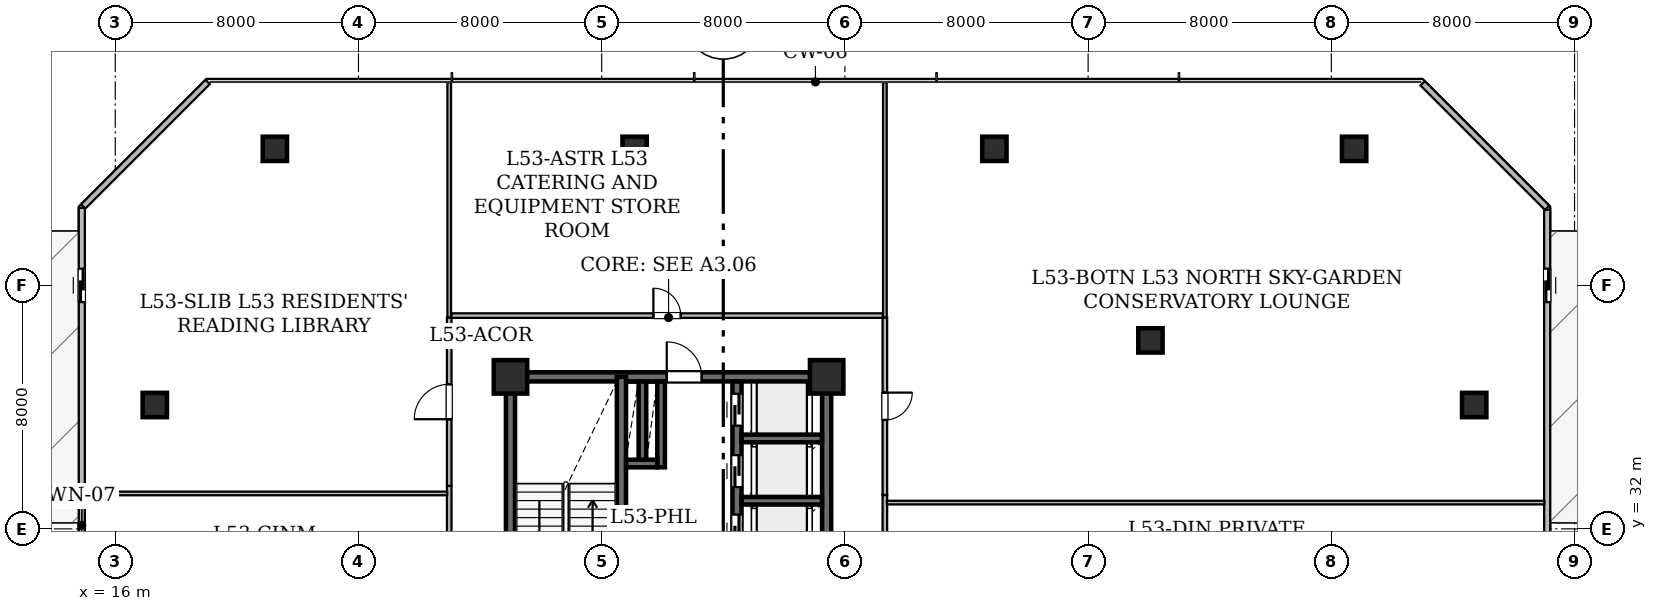
"""IFC4 building model, lengths in metres.
Left out: names, types, materials, properties, quantities, classifications, styles, units other than length and angle.
Written with IfcOpenShell. Run it as: python <this file> out.ifc"""

import sys

from ifc_helpers import new_model, si_unit, direction, frame, frame_2d, origin, origin_2d, place, context, subcontext, project, spatial, rectangle, hollow_rectangle, extrude, element, fill, save


model = new_model("IFC4")
c1 = context("Model", 3, precision=1e-05, world=origin(), true_north=direction((0.0, 1.0)))
c2 = subcontext(c1, "Body", "Model", "MODEL_VIEW")
j1 = project(units=[si_unit("LENGTHUNIT", "METRE"), si_unit("PLANEANGLEUNIT", "RADIAN")], contexts=[c1])
p1 = place(None, origin())
s1 = spatial("IfcSite", under=j1, at=p1, CompositionType="ELEMENT")
p2 = place(p1, origin())
s2 = spatial("IfcBuilding", under=s1, at=p2, CompositionType="ELEMENT")
p3 = place(p2, frame((0.0, 0.0, 207.0)))
s3 = spatial("IfcBuildingStorey", under=s2, at=p3, CompositionType="ELEMENT", Elevation=207.0)
for number, where, z_axis, x_axis in (
    (1, (29.0, 37.0, 0.0), (0.0, 0.0, 1.0), (1.0, 0.0, 0.0)),
    (2, (39.4, 37.0, 0.0), (0.0, 0.0, 1.0), (1.0, 0.0, 0.0)),
):
    element("IfcColumn", number, at=place(p3, frame(where, z_axis=z_axis, x_axis=x_axis)), inside=s3, PredefinedType="COLUMN", context=c2, shape_type="SweptSolid", body=[
        extrude(hollow_rectangle(XDim=1.1, YDim=1.1, WallThickness=0.055, at=origin_2d()), origin(), (0.0, 0.0, 1.0), 4.8),
    ])
for number, where, z_axis, x_axis in (
    (3, (21.25, 44.5, 0.0), (0.0, 0.0, 1.0), (1.0, 0.0, 0.0)),
    (4, (33.083, 44.5, 0.0), (0.0, 0.0, 1.0), (1.0, 0.0, 0.0)),
    (5, (44.917, 44.5, 0.0), (0.0, 0.0, 1.0), (1.0, 0.0, 0.0)),
    (6, (56.75, 44.5, 0.0), (0.0, 0.0, 1.0), (1.0, 0.0, 0.0)),
    (7, (17.3, 36.075, 0.0), (0.0, 0.0, 1.0), (1.0, 0.0, 0.0)),
    (8, (60.7, 36.075, 0.0), (0.0, 0.0, 1.0), (1.0, 0.0, 0.0)),
    (9, (50.05, 38.2, 0.0), (0.0, 0.0, 1.0), (1.0, 0.0, 0.0)),
):
    element("IfcColumn", number, at=place(p3, frame(where, z_axis=z_axis, x_axis=x_axis)), inside=s3, PredefinedType="COLUMN", context=c2, shape_type="SweptSolid", body=[
        extrude(hollow_rectangle(XDim=0.8, YDim=0.8, WallThickness=0.04, at=origin_2d()), origin(), (0.0, 0.0, 1.0), 4.8),
    ])
p4 = place(p3, frame((14.9, 31.284, 0.0), z_axis=(0.0, 0.0, 1.0), x_axis=(0.0, 1.0, 0.0)))
e10 = element("IfcWall", 10, at=p4, inside=s3, PredefinedType="STANDARD", context=c2, shape_type="SweptSolid", body=[
    extrude(rectangle(XDim=11.275, YDim=0.2, at=frame_2d((5.638, 0.0))), origin(), (0.0, 0.0, 1.0), 4.48),
])
p5 = place(p4, frame((8.175, 0.0, 0.0)))
e11 = element("IfcOpeningElement", 11, at=p5, cuts=e10, PredefinedType="OPENING", context=c2, shape_type="SweptSolid", body=[
    extrude(rectangle(XDim=1.1, YDim=2.2, at=frame_2d((0.55, 1.1))), frame((0.0, 0.11, 0.0), z_axis=(0.0, -1.0, 0.0), x_axis=(1.0, 0.0, 0.0)), (0.0, 0.0, 1.0), 0.22),
])
p6 = place(p4, frame((0.158, 0.0, 0.85)))
e12 = element("IfcOpeningElement", 12, at=p6, cuts=e10, PredefinedType="OPENING", context=c2, shape_type="SweptSolid", body=[
    extrude(rectangle(XDim=1.35, YDim=1.5, at=frame_2d((0.675, 0.75))), frame((0.0, 0.11, 0.0), z_axis=(0.0, -1.0, 0.0), x_axis=(1.0, 0.0, 0.0)), (0.0, 0.0, 1.0), 0.22),
])
p7 = place(p3, frame((14.945, 42.604, 0.0), z_axis=(0.0, 0.0, 1.0), x_axis=(0.707106781187, 0.707106781187, 0.0)))
e13 = element("IfcWall", 13, at=p7, inside=s3, PredefinedType="STANDARD", context=c2, shape_type="SweptSolid", body=[
    extrude(rectangle(XDim=5.792, YDim=0.2, at=frame_2d((2.896, 0.0))), origin(), (0.0, 0.0, 1.0), 4.48),
])
p8 = place(p3, frame((59.003, 46.656, 0.0), z_axis=(0.0, 0.0, 1.0), x_axis=(0.707127848917, -0.707085712828, 0.0)))
e14 = element("IfcWall", 14, at=p8, inside=s3, PredefinedType="STANDARD", context=c2, shape_type="SweptSolid", body=[
    extrude(rectangle(XDim=5.794, YDim=0.2, at=frame_2d((2.897, 0.0))), origin(), (0.0, 0.0, 1.0), 4.48),
])
p9 = place(p3, frame((63.1, 42.496, 0.0), z_axis=(0.0, 0.0, 1.0), x_axis=(0.0, -1.0, 0.0)))
e15 = element("IfcWall", 15, at=p9, inside=s3, PredefinedType="STANDARD", context=c2, shape_type="SweptSolid", body=[
    extrude(rectangle(XDim=11.263, YDim=0.2, at=frame_2d((5.632, 0.0))), origin(), (0.0, 0.0, 1.0), 4.48),
])
p10 = place(p9, frame((1.937, 0.0, 0.0)))
e16 = element("IfcOpeningElement", 16, at=p10, cuts=e15, PredefinedType="OPENING", context=c2, shape_type="SweptSolid", body=[
    extrude(rectangle(XDim=1.1, YDim=2.2, at=frame_2d((0.55, 1.1))), frame((0.0, 0.11, 0.0), z_axis=(0.0, -1.0, 0.0), x_axis=(1.0, 0.0, 0.0)), (0.0, 0.0, 1.0), 0.22),
])
p11 = place(p3, frame((29.0, 28.0, 0.0), z_axis=(0.0, 0.0, 1.0), x_axis=(0.0, 1.0, 0.0)))
e17 = element("IfcWall", 17, at=p11, inside=s3, PredefinedType="SHEAR", context=c2, shape_type="SweptSolid", body=[
    extrude(rectangle(XDim=9.0, YDim=0.3, at=frame_2d((4.5, 0.0))), origin(), (0.0, 0.0, 1.0), 4.48),
])
p12 = place(p3, frame((29.0, 37.0, 0.0), z_axis=(0.0, 0.0, 1.0), x_axis=(1.0, 0.0, 0.0)))
e18 = element("IfcWall", 18, at=p12, inside=s3, PredefinedType="SHEAR", context=c2, shape_type="SweptSolid", body=[
    extrude(rectangle(XDim=10.4, YDim=0.3, at=frame_2d((5.2, 0.0))), origin(), (0.0, 0.0, 1.0), 4.48),
])
p13 = place(p12, frame((5.14, 0.0, 0.0)))
e19 = element("IfcOpeningElement", 19, at=p13, cuts=e18, PredefinedType="OPENING", context=c2, shape_type="SweptSolid", body=[
    extrude(rectangle(XDim=1.15, YDim=2.2, at=frame_2d((0.575, 1.1))), frame((0.0, 0.16, 0.0), z_axis=(0.0, -1.0, 0.0), x_axis=(1.0, 0.0, 0.0)), (0.0, 0.0, 1.0), 0.32),
])
p14 = place(p3, frame((39.4, 24.4, 0.0), z_axis=(0.0, 0.0, 1.0), x_axis=(0.0, 1.0, 0.0)))
e20 = element("IfcWall", 20, at=p14, inside=s3, PredefinedType="SHEAR", context=c2, shape_type="SweptSolid", body=[
    extrude(rectangle(XDim=12.6, YDim=0.3, at=frame_2d((6.3, 0.0))), origin(), (0.0, 0.0, 1.0), 4.48),
])
p15 = place(p3, frame((32.65, 28.0, 0.0), z_axis=(0.0, 0.0, 1.0), x_axis=(0.0, 1.0, 0.0)))
e21 = element("IfcWall", 21, at=p15, inside=s3, PredefinedType="SHEAR", context=c2, shape_type="SweptSolid", body=[
    extrude(rectangle(XDim=9.0, YDim=0.3, at=frame_2d((4.5, 0.0))), origin(), (0.0, 0.0, 1.0), 4.48),
])
p16 = place(p15, frame((0.72, 0.0, 0.0)))
e22 = element("IfcOpeningElement", 22, at=p16, cuts=e21, PredefinedType="OPENING", context=c2, shape_type="SweptSolid", body=[
    extrude(rectangle(XDim=1.0, YDim=2.15, at=frame_2d((0.5, 1.075))), frame((0.0, 0.16, 0.0), z_axis=(0.0, -1.0, 0.0), x_axis=(1.0, 0.0, 0.0)), (0.0, 0.0, 1.0), 0.32),
])
p17 = place(p3, frame((36.45, 31.3, 0.0), z_axis=(0.0, 0.0, 1.0), x_axis=(0.0, 1.0, 0.0)))
e23 = element("IfcWall", 23, at=p17, inside=s3, PredefinedType="SHEAR", context=c2, shape_type="SweptSolid", body=[
    extrude(rectangle(XDim=5.546, YDim=0.3, at=frame_2d((2.773, 0.0))), origin(), (0.0, 0.0, 1.0), 4.48),
])
p18 = place(p17, frame((0.12, 0.0, 0.0)))
e24 = element("IfcOpeningElement", 24, at=p18, cuts=e23, PredefinedType="OPENING", context=c2, shape_type="SweptSolid", body=[
    extrude(rectangle(XDim=1.05, YDim=2.15, at=frame_2d((0.525, 1.075))), frame((0.0, 0.16, 0.0), z_axis=(0.0, -1.0, 0.0), x_axis=(1.0, 0.0, 0.0)), (0.0, 0.0, 1.0), 0.32),
])
p19 = place(p17, frame((2.075, 0.0, 0.0)))
e25 = element("IfcOpeningElement", 25, at=p19, cuts=e23, PredefinedType="OPENING", context=c2, shape_type="SweptSolid", body=[
    extrude(rectangle(XDim=1.05, YDim=2.15, at=frame_2d((0.525, 1.075))), frame((0.0, 0.16, 0.0), z_axis=(0.0, -1.0, 0.0), x_axis=(1.0, 0.0, 0.0)), (0.0, 0.0, 1.0), 0.32),
])
p20 = place(p17, frame((4.095, 0.0, 0.0)))
e26 = element("IfcOpeningElement", 26, at=p20, cuts=e23, PredefinedType="OPENING", context=c2, shape_type="SweptSolid", body=[
    extrude(rectangle(XDim=1.05, YDim=2.15, at=frame_2d((0.525, 1.075))), frame((0.0, 0.16, 0.0), z_axis=(0.0, -1.0, 0.0), x_axis=(1.0, 0.0, 0.0)), (0.0, 0.0, 1.0), 0.32),
])
for number, where, z_axis, x_axis in (
    (27, (36.604, 32.925, 0.0), (0.0, 0.0, 1.0), (1.0, 0.0, 0.0)),
    (28, (36.604, 34.975, 0.0), (0.0, 0.0, 1.0), (1.0, 0.0, 0.0)),
):
    element("IfcWall", number, at=place(p3, frame(where, z_axis=z_axis, x_axis=x_axis)), inside=s3, PredefinedType="SHEAR", context=c2, shape_type="SweptSolid", body=[
        extrude(rectangle(XDim=2.642, YDim=0.25, at=frame_2d((1.321, 0.0))), origin(), (0.0, 0.0, 1.0), 4.48),
    ])
p21 = place(p3, frame((33.955, 34.025, 0.0), z_axis=(0.0, 0.0, 1.0), x_axis=(0.0, 1.0, 0.0)))
e29 = element("IfcWall", 29, at=p21, inside=s3, PredefinedType="SHEAR", context=c2, shape_type="SweptSolid", body=[
    extrude(rectangle(XDim=2.821, YDim=0.25, at=frame_2d((1.411, 0.0))), origin(), (0.0, 0.0, 1.0), 4.48),
])
p22 = place(p3, frame((32.804, 34.15, 0.0), z_axis=(0.0, 0.0, 1.0), x_axis=(1.0, 0.0, 0.0)))
e30 = element("IfcWall", 30, at=p22, inside=s3, PredefinedType="SHEAR", context=c2, shape_type="SweptSolid", body=[
    extrude(rectangle(XDim=1.022, YDim=0.25, at=frame_2d((0.511, 0.0))), origin(), (0.0, 0.0, 1.0), 4.48),
])
p23 = place(p3, frame((33.34, 34.279, 0.0), z_axis=(0.0, 0.0, 1.0), x_axis=(0.0, 1.0, 0.0)))
e31 = element("IfcWall", 31, at=p23, inside=s3, PredefinedType="SHEAR", context=c2, shape_type="SweptSolid", body=[
    extrude(rectangle(XDim=2.567, YDim=0.25, at=frame_2d((1.283, 0.0))), origin(), (0.0, 0.0, 1.0), 4.48),
])
p24 = place(p3, frame((26.985, 28.314, 0.0), z_axis=(0.0, 0.0, 1.0), x_axis=(0.0, 1.0, 0.0)))
e32 = element("IfcWall", 32, at=p24, inside=s3, PredefinedType="STANDARD", context=c2, shape_type="SweptSolid", body=[
    extrude(rectangle(XDim=5.1, YDim=0.15, at=frame_2d((2.55, 0.0))), origin(), (0.0, 0.0, 1.0), 4.007),
])
p25 = place(p24, frame((2.079, 0.0, 0.0)))
e33 = element("IfcOpeningElement", 33, at=p25, cuts=e32, PredefinedType="OPENING", context=c2, shape_type="SweptSolid", body=[
    extrude(rectangle(XDim=0.9, YDim=2.1, at=frame_2d((0.45, 1.05))), frame((0.0, 0.085, 0.0), z_axis=(0.0, -1.0, 0.0), x_axis=(1.0, 0.0, 0.0)), (0.0, 0.0, 1.0), 0.17),
])
p26 = place(p3, frame((26.985, 33.414, 0.0), z_axis=(0.0, 0.0, 1.0), x_axis=(0.0, 1.0, 0.0)))
e34 = element("IfcWall", 34, at=p26, inside=s3, PredefinedType="STANDARD", context=c2, shape_type="SweptSolid", body=[
    extrude(rectangle(XDim=5.536, YDim=0.15, at=frame_2d((2.768, 0.0))), origin(), (0.0, 0.0, 1.0), 3.775),
])
p27 = place(p26, frame((2.193, 0.0, 0.0)))
e35 = element("IfcOpeningElement", 35, at=p27, cuts=e34, PredefinedType="OPENING", context=c2, shape_type="SweptSolid", body=[
    extrude(rectangle(XDim=1.15, YDim=2.2, at=frame_2d((0.575, 1.1))), frame((0.0, 0.085, 0.0), z_axis=(0.0, -1.0, 0.0), x_axis=(1.0, 0.0, 0.0)), (0.0, 0.0, 1.0), 0.17),
])
p28 = place(p3, frame((41.315, 33.114, 0.0), z_axis=(0.0, 0.0, 1.0), x_axis=(0.0, -1.0, 0.0)))
e36 = element("IfcWall", 36, at=p28, inside=s3, PredefinedType="STANDARD", context=c2, shape_type="SweptSolid", body=[
    extrude(rectangle(XDim=4.8, YDim=0.15, at=frame_2d((2.4, 0.0))), origin(), (0.0, 0.0, 1.0), 4.007),
])
p29 = place(p28, frame((1.846, 0.0, 0.0)))
e37 = element("IfcOpeningElement", 37, at=p29, cuts=e36, PredefinedType="OPENING", context=c2, shape_type="SweptSolid", body=[
    extrude(rectangle(XDim=1.15, YDim=2.2, at=frame_2d((0.575, 1.1))), frame((0.0, 0.085, 0.0), z_axis=(0.0, -1.0, 0.0), x_axis=(1.0, 0.0, 0.0)), (0.0, 0.0, 1.0), 0.17),
])
p30 = place(p3, frame((41.315, 38.95, 0.0), z_axis=(0.0, 0.0, 1.0), x_axis=(0.0, -1.0, 0.0)))
e38 = element("IfcWall", 38, at=p30, inside=s3, PredefinedType="STANDARD", context=c2, shape_type="SweptSolid", body=[
    extrude(rectangle(XDim=5.836, YDim=0.15, at=frame_2d((2.918, 0.0))), origin(), (0.0, 0.0, 1.0), 3.775),
])
p31 = place(p30, frame((2.468, 0.0, 0.0)))
e39 = element("IfcOpeningElement", 39, at=p31, cuts=e38, PredefinedType="OPENING", context=c2, shape_type="SweptSolid", body=[
    extrude(rectangle(XDim=0.9, YDim=2.1, at=frame_2d((0.45, 1.05))), frame((0.0, 0.085, 0.0), z_axis=(0.0, -1.0, 0.0), x_axis=(1.0, 0.0, 0.0)), (0.0, 0.0, 1.0), 0.17),
])
p32 = place(p3, frame((27.05, 39.015, 0.0), z_axis=(0.0, 0.0, 1.0), x_axis=(1.0, 0.0, 0.0)))
e40 = element("IfcWall", 40, at=p32, inside=s3, PredefinedType="STANDARD", context=c2, shape_type="SweptSolid", body=[
    extrude(rectangle(XDim=14.2, YDim=0.15, at=frame_2d((7.1, 0.0))), origin(), (0.0, 0.0, 1.0), 3.775),
])
p33 = place(p32, frame((6.65, 0.0, 0.0)))
e41 = element("IfcOpeningElement", 41, at=p33, cuts=e40, PredefinedType="OPENING", context=c2, shape_type="SweptSolid", body=[
    extrude(rectangle(XDim=0.9, YDim=2.1, at=frame_2d((0.45, 1.05))), frame((0.0, 0.085, 0.0), z_axis=(0.0, -1.0, 0.0), x_axis=(1.0, 0.0, 0.0)), (0.0, 0.0, 1.0), 0.17),
])
p34 = place(p3, frame((14.992, 33.165, 0.0), z_axis=(0.0, 0.0, 1.0), x_axis=(1.0, 0.0, 0.0)))
e42 = element("IfcWall", 42, at=p34, inside=s3, PredefinedType="PARTITIONING", context=c2, shape_type="SweptSolid", body=[
    extrude(rectangle(XDim=11.926, YDim=0.12, at=frame_2d((5.963, 0.0))), origin(), (0.0, 0.0, 1.0), 3.937),
])
p35 = place(p3, frame((26.985, 46.69, 0.0), z_axis=(0.0, 0.0, 1.0), x_axis=(0.0, -1.0, 0.0)))
e43 = element("IfcWall", 43, at=p35, inside=s3, PredefinedType="PARTITIONING", context=c2, shape_type="SweptSolid", body=[
    extrude(rectangle(XDim=7.74, YDim=0.12, at=frame_2d((3.87, 0.0))), origin(), (0.0, 0.0, 1.0), 3.775),
])
p36 = place(p3, frame((41.38, 32.865, 0.0), z_axis=(0.0, 0.0, 1.0), x_axis=(1.0, 0.0, 0.0)))
e44 = element("IfcWall", 44, at=p36, inside=s3, PredefinedType="PARTITIONING", context=c2, shape_type="SweptSolid", body=[
    extrude(rectangle(XDim=21.628, YDim=0.12, at=frame_2d((10.814, 0.0))), origin(), (0.0, 0.0, 1.0), 3.775),
])
p37 = place(p3, frame((41.315, 38.95, 0.0), z_axis=(0.0, 0.0, 1.0), x_axis=(0.0, 1.0, 0.0)))
e45 = element("IfcWall", 45, at=p37, inside=s3, PredefinedType="PARTITIONING", context=c2, shape_type="SweptSolid", body=[
    extrude(rectangle(XDim=7.74, YDim=0.12, at=frame_2d((3.87, 0.0))), origin(), (0.0, 0.0, 1.0), 3.775),
])
p38 = place(p5, origin())
e46 = element("IfcDoor", 46, at=p38, inside=s3, OperationType="SLIDING_TO_LEFT", PredefinedType="DOOR", context=c2, shape_type="SweptSolid", body=[
    extrude(rectangle(XDim=1.1, YDim=2.2, at=frame_2d((0.55, 1.1))), frame((0.0, 0.025, 0.0), z_axis=(0.0, -1.0, 0.0), x_axis=(1.0, 0.0, 0.0)), (0.0, 0.0, 1.0), 0.05),
])
fill(e11, e46)
p39 = place(p10, origin())
e47 = element("IfcDoor", 47, at=p39, inside=s3, OperationType="SLIDING_TO_LEFT", PredefinedType="DOOR", context=c2, shape_type="SweptSolid", body=[
    extrude(rectangle(XDim=1.1, YDim=2.2, at=frame_2d((0.55, 1.1))), frame((0.0, 0.025, 0.0), z_axis=(0.0, -1.0, 0.0), x_axis=(1.0, 0.0, 0.0)), (0.0, 0.0, 1.0), 0.05),
])
fill(e16, e47)
p40 = place(p6, origin())
e48 = element("IfcWindow", 48, at=p40, inside=s3, PartitioningType="SINGLE_PANEL", PredefinedType="WINDOW", context=c2, shape_type="SweptSolid", body=[
    extrude(rectangle(XDim=1.35, YDim=1.5, at=frame_2d((0.675, 0.75))), frame((0.0, 0.03, 0.0), z_axis=(0.0, -1.0, 0.0), x_axis=(1.0, 0.0, 0.0)), (0.0, 0.0, 1.0), 0.06),
])
fill(e12, e48)
p41 = place(p13, origin())
e49 = element("IfcDoor", 49, at=p41, inside=s3, OperationType="SINGLE_SWING_LEFT", PredefinedType="DOOR", context=c2, shape_type="SweptSolid", body=[
    extrude(rectangle(XDim=1.15, YDim=2.2, at=frame_2d((0.575, 1.1))), frame((0.0, 0.025, 0.0), z_axis=(0.0, -1.0, 0.0), x_axis=(1.0, 0.0, 0.0)), (0.0, 0.0, 1.0), 0.05),
])
fill(e19, e49)
p42 = place(p18, origin())
e50 = element("IfcDoor", 50, at=p42, inside=s3, OperationType="SLIDING_TO_LEFT", PredefinedType="DOOR", context=c2, shape_type="SweptSolid", body=[
    extrude(rectangle(XDim=1.05, YDim=2.15, at=frame_2d((0.525, 1.075))), frame((0.0, 0.025, 0.0), z_axis=(0.0, -1.0, 0.0), x_axis=(1.0, 0.0, 0.0)), (0.0, 0.0, 1.0), 0.05),
])
fill(e24, e50)
p43 = place(p19, origin())
e51 = element("IfcDoor", 51, at=p43, inside=s3, OperationType="SLIDING_TO_LEFT", PredefinedType="DOOR", context=c2, shape_type="SweptSolid", body=[
    extrude(rectangle(XDim=1.05, YDim=2.15, at=frame_2d((0.525, 1.075))), frame((0.0, 0.025, 0.0), z_axis=(0.0, -1.0, 0.0), x_axis=(1.0, 0.0, 0.0)), (0.0, 0.0, 1.0), 0.05),
])
fill(e25, e51)
p44 = place(p20, origin())
e52 = element("IfcDoor", 52, at=p44, inside=s3, OperationType="SLIDING_TO_LEFT", PredefinedType="DOOR", context=c2, shape_type="SweptSolid", body=[
    extrude(rectangle(XDim=1.05, YDim=2.15, at=frame_2d((0.525, 1.075))), frame((0.0, 0.025, 0.0), z_axis=(0.0, -1.0, 0.0), x_axis=(1.0, 0.0, 0.0)), (0.0, 0.0, 1.0), 0.05),
])
fill(e26, e52)
p45 = place(p27, origin())
e53 = element("IfcDoor", 53, at=p45, inside=s3, OperationType="SINGLE_SWING_LEFT", PredefinedType="DOOR", context=c2, shape_type="SweptSolid", body=[
    extrude(rectangle(XDim=1.15, YDim=2.2, at=frame_2d((0.575, 1.1))), frame((0.0, 0.025, 0.0), z_axis=(0.0, -1.0, 0.0), x_axis=(1.0, 0.0, 0.0)), (0.0, 0.0, 1.0), 0.05),
])
fill(e35, e53)
p46 = place(p31, origin())
e54 = element("IfcDoor", 54, at=p46, inside=s3, OperationType="SINGLE_SWING_LEFT", PredefinedType="DOOR", context=c2, shape_type="SweptSolid", body=[
    extrude(rectangle(XDim=0.9, YDim=2.1, at=frame_2d((0.45, 1.05))), frame((0.0, 0.025, 0.0), z_axis=(0.0, -1.0, 0.0), x_axis=(1.0, 0.0, 0.0)), (0.0, 0.0, 1.0), 0.05),
])
fill(e39, e54)
p47 = place(p33, origin())
e55 = element("IfcDoor", 55, at=p47, inside=s3, OperationType="SINGLE_SWING_LEFT", PredefinedType="DOOR", context=c2, shape_type="SweptSolid", body=[
    extrude(rectangle(XDim=0.9, YDim=2.1, at=frame_2d((0.45, 1.05))), frame((0.0, 0.025, 0.0), z_axis=(0.0, -1.0, 0.0), x_axis=(1.0, 0.0, 0.0)), (0.0, 0.0, 1.0), 0.05),
])
fill(e41, e55)
save(model, sys.argv[1])
